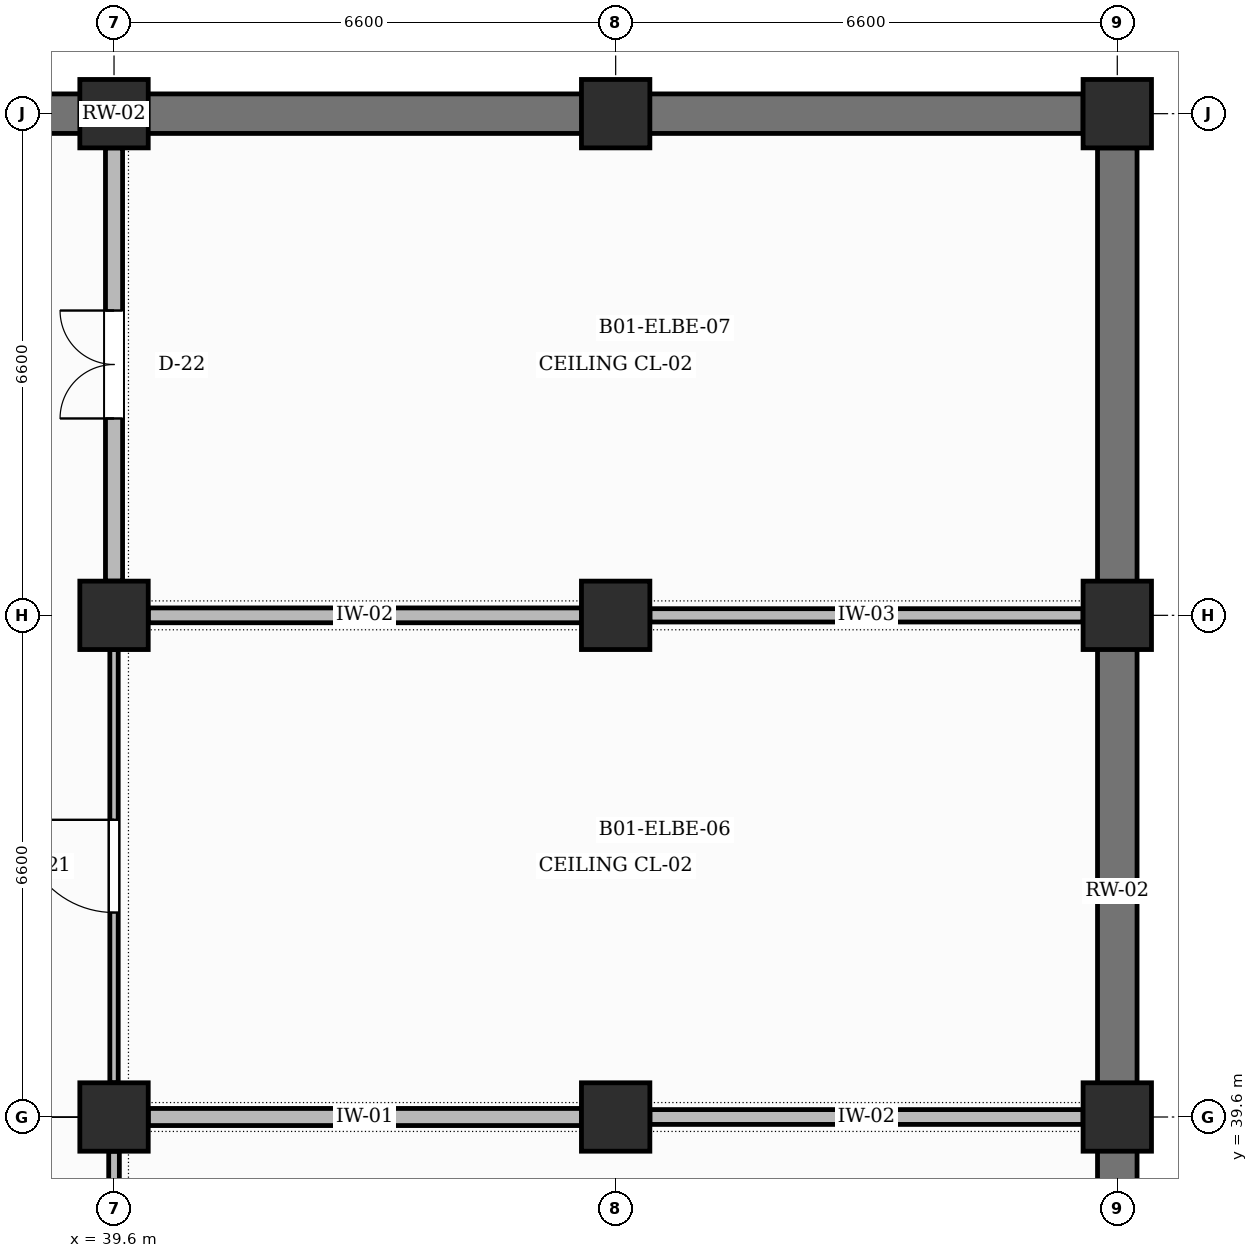
"""IFC4 building model, lengths in metres.
Left out: names, types, materials, properties, quantities, classifications, styles, units other than length and angle.
Written with IfcOpenShell. Run it as: python <this file> out.ifc"""

import sys

from ifc_helpers import new_model, si_unit, direction, frame, frame_2d, origin, origin_2d, place, context, subcontext, project, spatial, rectangle, extrude, element, fill, save


model = new_model("IFC4")
c1 = context("Model", 3, precision=1e-05, world=origin(), true_north=direction((0.0, 1.0)))
c2 = subcontext(c1, "Body", "Model", "MODEL_VIEW")
j1 = project(units=[si_unit("LENGTHUNIT", "METRE"), si_unit("PLANEANGLEUNIT", "RADIAN")], contexts=[c1])
p1 = place(None, origin())
s1 = spatial("IfcSite", under=j1, at=p1, CompositionType="ELEMENT")
p2 = place(p1, origin())
s2 = spatial("IfcBuilding", under=s1, at=p2, CompositionType="ELEMENT")
p3 = place(p2, frame((0.0, 0.0, -4.5)))
s3 = spatial("IfcBuildingStorey", under=s2, at=p3, CompositionType="ELEMENT", Elevation=-4.5)
for number, where, z_axis, x_axis in (
    (1, (39.6, 39.6, 0.0), (0.0, 0.0, 1.0), (1.0, 0.0, 0.0)),
    (2, (39.6, 46.2, 0.0), (0.0, 0.0, 1.0), (1.0, 0.0, 0.0)),
    (3, (39.6, 52.8, 0.0), (0.0, 0.0, 1.0), (1.0, 0.0, 0.0)),
    (4, (46.2, 39.6, 0.0), (0.0, 0.0, 1.0), (1.0, 0.0, 0.0)),
    (5, (46.2, 46.2, 0.0), (0.0, 0.0, 1.0), (1.0, 0.0, 0.0)),
    (6, (46.2, 52.8, 0.0), (0.0, 0.0, 1.0), (1.0, 0.0, 0.0)),
    (7, (52.8, 39.6, 0.0), (0.0, 0.0, 1.0), (1.0, 0.0, 0.0)),
    (8, (52.8, 46.2, 0.0), (0.0, 0.0, 1.0), (1.0, 0.0, 0.0)),
    (9, (52.8, 52.8, 0.0), (0.0, 0.0, 1.0), (1.0, 0.0, 0.0)),
):
    element("IfcColumn", number, at=place(p3, frame(where, z_axis=z_axis, x_axis=x_axis)), inside=s3, PredefinedType="COLUMN", context=c2, shape_type="SweptSolid", body=[
        extrude(rectangle(XDim=0.9, YDim=0.9, at=origin_2d()), origin(), (0.0, 0.0, 1.0), 4.5),
    ])
for number, where, z_axis, x_axis in (
    (10, (33.45, 52.8, 0.0), (0.0, 0.0, 1.0), (1.0, 0.0, 0.0)),
    (11, (40.05, 52.8, 0.0), (0.0, 0.0, 1.0), (1.0, 0.0, 0.0)),
    (12, (52.8, 33.45, 0.0), (0.0, 0.0, 1.0), (0.0, 1.0, 0.0)),
    (13, (52.8, 40.05, 0.0), (0.0, 0.0, 1.0), (0.0, 1.0, 0.0)),
):
    element("IfcWall", number, at=place(p3, frame(where, z_axis=z_axis, x_axis=x_axis)), inside=s3, PredefinedType="USERDEFINED", context=c2, shape_type="SweptSolid", body=[
        extrude(rectangle(XDim=5.7, YDim=0.52, at=frame_2d((2.85, 0.0))), origin(), (0.0, 0.0, 1.0), 3.49),
    ])
for number, where, z_axis, x_axis in (
    (14, (46.65, 52.8, 0.0), (0.0, 0.0, 1.0), (1.0, 0.0, 0.0)),
    (15, (52.8, 46.65, 0.0), (0.0, 0.0, 1.0), (0.0, 1.0, 0.0)),
):
    element("IfcWall", number, at=place(p3, frame(where, z_axis=z_axis, x_axis=x_axis)), inside=s3, PredefinedType="USERDEFINED", context=c2, shape_type="SweptSolid", body=[
        extrude(rectangle(XDim=5.7, YDim=0.52, at=frame_2d((2.85, 0.0))), origin(), (0.0, 0.0, 1.0), 3.49),
    ])
p4 = place(p3, frame((39.6, 33.45, 0.0), z_axis=(0.0, 0.0, 1.0), x_axis=(0.0, 1.0, 0.0)))
e16 = element("IfcWall", 16, at=p4, inside=s3, PredefinedType="PARTITIONING", context=c2, shape_type="SweptSolid", body=[
    extrude(rectangle(XDim=5.7, YDim=0.14, at=frame_2d((2.85, 0.0))), origin(), (0.0, 0.0, 1.0), 3.34),
])
p5 = place(p4, frame((2.325, 0.0, 0.0)))
e17 = element("IfcOpeningElement", 17, at=p5, cuts=e16, PredefinedType="OPENING", context=c2, shape_type="SweptSolid", body=[
    extrude(rectangle(XDim=1.05, YDim=2.15, at=frame_2d((0.525, 1.075))), frame((0.0, 0.08, 0.0), z_axis=(0.0, -1.0, 0.0), x_axis=(1.0, 0.0, 0.0)), (0.0, 0.0, 1.0), 0.16),
])
p6 = place(p3, frame((39.6, 40.05, 0.0), z_axis=(0.0, 0.0, 1.0), x_axis=(0.0, 1.0, 0.0)))
e18 = element("IfcWall", 18, at=p6, inside=s3, PredefinedType="PARTITIONING", context=c2, shape_type="SweptSolid", body=[
    extrude(rectangle(XDim=5.7, YDim=0.11, at=frame_2d((2.85, 0.0))), origin(), (0.0, 0.0, 1.0), 3.34),
])
p7 = place(p6, frame((2.24, 0.0, 0.0)))
e19 = element("IfcOpeningElement", 19, at=p7, cuts=e18, PredefinedType="OPENING", context=c2, shape_type="SweptSolid", body=[
    extrude(rectangle(XDim=1.22, YDim=2.15, at=frame_2d((0.61, 1.075))), frame((0.0, 0.065, 0.0), z_axis=(0.0, -1.0, 0.0), x_axis=(1.0, 0.0, 0.0)), (0.0, 0.0, 1.0), 0.13),
])
p8 = place(p3, frame((39.6, 46.65, 0.0), z_axis=(0.0, 0.0, 1.0), x_axis=(0.0, 1.0, 0.0)))
e20 = element("IfcWall", 20, at=p8, inside=s3, PredefinedType="PARTITIONING", context=c2, shape_type="SweptSolid", body=[
    extrude(rectangle(XDim=5.7, YDim=0.225, at=frame_2d((2.85, 0.0))), origin(), (0.0, 0.0, 1.0), 3.34),
])
p9 = place(p8, frame((2.14, 0.0, 0.0)))
e21 = element("IfcOpeningElement", 21, at=p9, cuts=e20, PredefinedType="OPENING", context=c2, shape_type="SweptSolid", body=[
    extrude(rectangle(XDim=1.42, YDim=2.2, at=frame_2d((0.71, 1.1))), frame((0.0, 0.123, 0.0), z_axis=(0.0, -1.0, 0.0), x_axis=(1.0, 0.0, 0.0)), (0.0, 0.0, 1.0), 0.245),
])
p10 = place(p3, frame((40.05, 39.6, 0.0), z_axis=(0.0, 0.0, 1.0), x_axis=(1.0, 0.0, 0.0)))
e22 = element("IfcWall", 22, at=p10, inside=s3, PredefinedType="PARTITIONING", context=c2, shape_type="SweptSolid", body=[
    extrude(rectangle(XDim=5.7, YDim=0.225, at=frame_2d((2.85, 0.0))), origin(), (0.0, 0.0, 1.0), 3.24),
])
p11 = place(p3, frame((40.05, 46.2, 0.0), z_axis=(0.0, 0.0, 1.0), x_axis=(1.0, 0.0, 0.0)))
e23 = element("IfcWall", 23, at=p11, inside=s3, PredefinedType="PARTITIONING", context=c2, shape_type="SweptSolid", body=[
    extrude(rectangle(XDim=5.7, YDim=0.195, at=frame_2d((2.85, 0.0))), origin(), (0.0, 0.0, 1.0), 3.34),
])
p12 = place(p3, frame((46.65, 39.6, 0.0), z_axis=(0.0, 0.0, 1.0), x_axis=(1.0, 0.0, 0.0)))
e24 = element("IfcWall", 24, at=p12, inside=s3, PredefinedType="PARTITIONING", context=c2, shape_type="SweptSolid", body=[
    extrude(rectangle(XDim=5.7, YDim=0.195, at=frame_2d((2.85, 0.0))), origin(), (0.0, 0.0, 1.0), 3.34),
])
p13 = place(p3, frame((46.65, 46.2, 0.0), z_axis=(0.0, 0.0, 1.0), x_axis=(1.0, 0.0, 0.0)))
e25 = element("IfcWall", 25, at=p13, inside=s3, PredefinedType="PARTITIONING", context=c2, shape_type="SweptSolid", body=[
    extrude(rectangle(XDim=5.7, YDim=0.175, at=frame_2d((2.85, 0.0))), origin(), (0.0, 0.0, 1.0), 3.24),
])
p14 = place(p7, origin())
e26 = element("IfcDoor", 26, at=p14, inside=s3, OperationType="SINGLE_SWING_RIGHT", PredefinedType="DOOR", context=c2, shape_type="SweptSolid", body=[
    extrude(rectangle(XDim=1.22, YDim=2.15, at=frame_2d((0.61, 1.075))), frame((0.0, 0.025, 0.0), z_axis=(0.0, -1.0, 0.0), x_axis=(1.0, 0.0, 0.0)), (0.0, 0.0, 1.0), 0.05),
])
fill(e19, e26)
p15 = place(p9, origin())
e27 = element("IfcDoor", 27, at=p15, inside=s3, OperationType="DOUBLE_DOOR_SINGLE_SWING", PredefinedType="DOOR", context=c2, shape_type="SweptSolid", body=[
    extrude(rectangle(XDim=1.42, YDim=2.2, at=frame_2d((0.71, 1.1))), frame((0.0, 0.025, 0.0), z_axis=(0.0, -1.0, 0.0), x_axis=(1.0, 0.0, 0.0)), (0.0, 0.0, 1.0), 0.05),
])
fill(e21, e27)
save(model, sys.argv[1])
